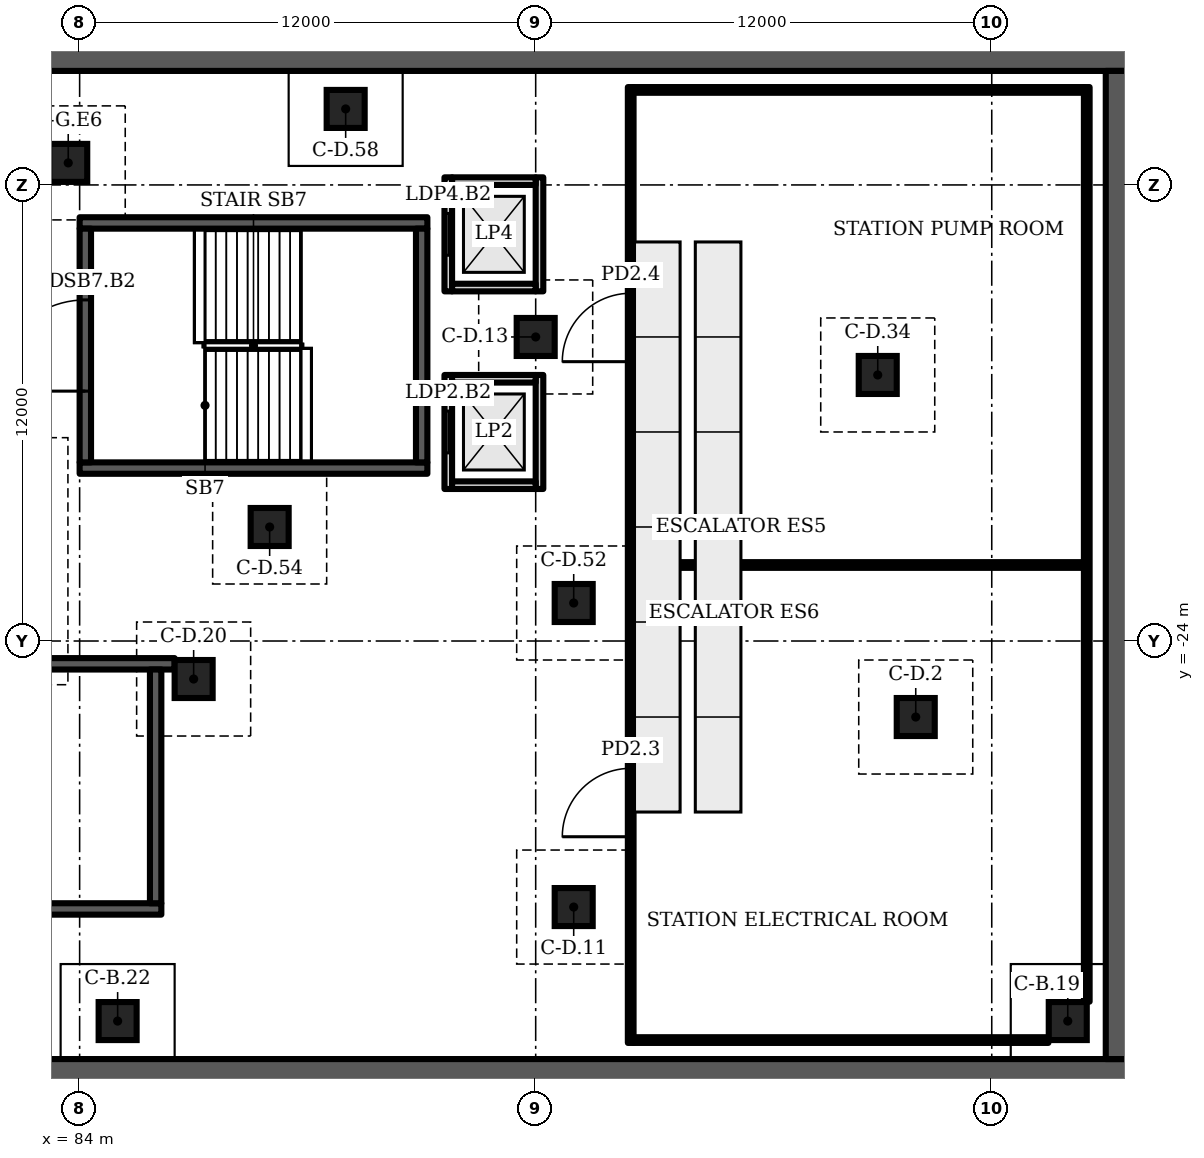
"""IFC4 building model, lengths in metres.
Left out: names, types, materials, properties, quantities, classifications, styles, units other than length and angle.
Written with IfcOpenShell. Run it as: python <this file> out.ifc"""

import sys

from ifc_helpers import new_model, si_unit, direction, frame, frame_2d, origin, origin_2d, place, context, subcontext, project, spatial, rectangle, extrude, element, fill, save


model = new_model("IFC4")
c1 = context("Model", 3, precision=1e-05, world=origin(), true_north=direction((0.0, 1.0)))
c2 = subcontext(c1, "Body", "Model", "MODEL_VIEW")
j1 = project(units=[si_unit("LENGTHUNIT", "METRE"), si_unit("PLANEANGLEUNIT", "RADIAN")], contexts=[c1])
p1 = place(None, origin())
s1 = spatial("IfcSite", under=j1, at=p1, CompositionType="ELEMENT")
p2 = place(p1, origin())
s2 = spatial("IfcBuilding", under=s1, at=p2, CompositionType="ELEMENT")
p3 = place(p2, frame((0.0, 0.0, -14.4)))
s3 = spatial("IfcBuildingStorey", under=s2, at=p3, CompositionType="ELEMENT", Elevation=-14.4)
for number, where, z_axis, x_axis in (
    (1, (-16.0, -35.5, -13.6), (0.0, 0.0, 1.0), (1.0, 0.0, 0.0)),
    (2, (-16.0, -8.5, -13.6), (0.0, 0.0, 1.0), (1.0, 0.0, 0.0)),
):
    element("IfcWall", number, at=place(p3, frame(where, z_axis=z_axis, x_axis=x_axis)), inside=s3, PredefinedType="SOLIDWALL", context=c2, shape_type="SweptSolid", body=[
        extrude(rectangle(XDim=128.0, YDim=1.0, at=frame_2d((64.0, 0.0))), origin(), (0.0, 0.0, 1.0), 20.8),
    ])
p4 = place(p3, frame((111.5, -35.0, -13.6), z_axis=(0.0, 0.0, 1.0), x_axis=(0.0, 1.0, 0.0)))
e3 = element("IfcWall", 3, at=p4, inside=s3, PredefinedType="SOLIDWALL", context=c2, shape_type="SweptSolid", body=[
    extrude(rectangle(XDim=26.0, YDim=1.0, at=frame_2d((13.0, 0.0))), origin(), (0.0, 0.0, 1.0), 20.8),
])
for number, where, z_axis, x_axis in (
    (4, (83.7, -11.42, 0.0), (0.0, 0.0, 1.0), (1.0, 0.0, 0.0)),
    (5, (106.0, -26.0, 0.0), (0.0, 0.0, 1.0), (1.0, 0.0, 0.0)),
    (6, (97.0, -31.0, 0.0), (0.0, 0.0, 1.0), (1.0, 0.0, 0.0)),
    (7, (96.0, -16.0, 0.0), (0.0, 0.0, 1.0), (1.0, 0.0, 0.0)),
    (8, (87.0, -25.0, 0.0), (0.0, 0.0, 1.0), (1.0, 0.0, 0.0)),
    (9, (105.0, -17.0, 0.0), (0.0, 0.0, 1.0), (1.0, 0.0, 0.0)),
    (10, (97.0, -23.0, 0.0), (0.0, 0.0, 1.0), (1.0, 0.0, 0.0)),
    (11, (89.0, -21.0, 0.0), (0.0, 0.0, 1.0), (1.0, 0.0, 0.0)),
    (12, (91.0, -10.0, 0.0), (0.0, 0.0, 1.0), (1.0, 0.0, 0.0)),
    (13, (110.0, -34.0, 0.0), (0.0, 0.0, 1.0), (1.0, 0.0, 0.0)),
    (14, (85.0, -34.0, 0.0), (0.0, 0.0, 1.0), (1.0, 0.0, 0.0)),
):
    element("IfcColumn", number, at=place(p3, frame(where, z_axis=z_axis, x_axis=x_axis)), inside=s3, PredefinedType="COLUMN", context=c2, shape_type="SweptSolid", body=[
        extrude(rectangle(XDim=1.0, YDim=1.0, at=origin_2d()), origin(), (0.0, 0.0, 1.0), 7.2),
    ])
p5 = place(p3, frame((98.575, -34.5, 0.0), z_axis=(0.0, 0.0, 1.0), x_axis=(1.0, 0.0, 0.0)))
e15 = element("IfcWall", 15, at=p5, inside=s3, PredefinedType="PARTITIONING", context=c2, shape_type="SweptSolid", body=[
    extrude(rectangle(XDim=10.915, YDim=0.15, at=frame_2d((5.458, 0.0))), origin(), (0.0, 0.0, 1.0), 6.9),
])
for number, where, z_axis, x_axis in (
    (16, (98.575, -22.0, 0.0), (0.0, 0.0, 1.0), (1.0, 0.0, 0.0)),
    (17, (98.575, -9.5, 0.0), (0.0, 0.0, 1.0), (1.0, 0.0, 0.0)),
):
    element("IfcWall", number, at=place(p3, frame(where, z_axis=z_axis, x_axis=x_axis)), inside=s3, PredefinedType="PARTITIONING", context=c2, shape_type="SweptSolid", body=[
        extrude(rectangle(XDim=11.85, YDim=0.15, at=frame_2d((5.925, 0.0))), origin(), (0.0, 0.0, 1.0), 6.9),
    ])
p6 = place(p3, frame((110.5, -33.49, 0.0), z_axis=(0.0, 0.0, 1.0), x_axis=(0.0, 1.0, 0.0)))
e18 = element("IfcWall", 18, at=p6, inside=s3, PredefinedType="PARTITIONING", context=c2, shape_type="SweptSolid", body=[
    extrude(rectangle(XDim=24.065, YDim=0.15, at=frame_2d((12.032, 0.0))), origin(), (0.0, 0.0, 1.0), 6.9),
])
p7 = place(p3, frame((98.5, -34.575, 0.0), z_axis=(0.0, 0.0, 1.0), x_axis=(0.0, 1.0, 0.0)))
e19 = element("IfcWall", 19, at=p7, inside=s3, PredefinedType="PARTITIONING", context=c2, shape_type="SweptSolid", body=[
    extrude(rectangle(XDim=25.15, YDim=0.15, at=frame_2d((12.575, 0.0))), origin(), (0.0, 0.0, 1.0), 6.9),
])
p8 = place(p7, frame((5.425, 0.0, 0.0)))
e20 = element("IfcOpeningElement", 20, at=p8, cuts=e19, PredefinedType="OPENING", context=c2, shape_type="SweptSolid", body=[
    extrude(rectangle(XDim=1.8, YDim=2.1, at=frame_2d((0.9, 1.05))), frame((0.0, 0.085, 0.0), z_axis=(0.0, -1.0, 0.0), x_axis=(1.0, 0.0, 0.0)), (0.0, 0.0, 1.0), 0.17),
])
p9 = place(p7, frame((17.925, 0.0, 0.0)))
e21 = element("IfcOpeningElement", 21, at=p9, cuts=e19, PredefinedType="OPENING", context=c2, shape_type="SweptSolid", body=[
    extrude(rectangle(XDim=1.8, YDim=2.1, at=frame_2d((0.9, 1.05))), frame((0.0, 0.085, 0.0), z_axis=(0.0, -1.0, 0.0), x_axis=(1.0, 0.0, 0.0)), (0.0, 0.0, 1.0), 0.17),
])
p10 = place(p3, frame((77.0, -31.05, 0.0), z_axis=(0.0, 0.0, 1.0), x_axis=(1.0, 0.0, 0.0)))
e22 = element("IfcWall", 22, at=p10, inside=s3, PredefinedType="SHEAR", context=c2, shape_type="SweptSolid", body=[
    extrude(rectangle(XDim=9.15, YDim=0.3, at=frame_2d((4.575, 0.0))), origin(), (0.0, 0.0, 1.0), 6.9),
])
p11 = place(p3, frame((77.0, -24.6, 0.0), z_axis=(0.0, 0.0, 1.0), x_axis=(1.0, 0.0, 0.0)))
e23 = element("IfcWall", 23, at=p11, inside=s3, PredefinedType="SHEAR", context=c2, shape_type="SweptSolid", body=[
    extrude(rectangle(XDim=9.5, YDim=0.3, at=frame_2d((4.75, 0.0))), origin(), (0.0, 0.0, 1.0), 6.9),
])
p12 = place(p3, frame((86.0, -30.9, 0.0), z_axis=(0.0, 0.0, 1.0), x_axis=(0.0, 1.0, 0.0)))
e24 = element("IfcWall", 24, at=p12, inside=s3, PredefinedType="SHEAR", context=c2, shape_type="SweptSolid", body=[
    extrude(rectangle(XDim=6.15, YDim=0.3, at=frame_2d((3.075, 0.0))), origin(), (0.0, 0.0, 1.0), 6.9),
])
for number, where, z_axis, x_axis in (
    (25, (84.0, -19.45, 0.0), (0.0, 0.0, 1.0), (1.0, 0.0, 0.0)),
    (26, (84.0, -13.0, 0.0), (0.0, 0.0, 1.0), (1.0, 0.0, 0.0)),
):
    element("IfcWall", number, at=place(p3, frame(where, z_axis=z_axis, x_axis=x_axis)), inside=s3, PredefinedType="SHEAR", context=c2, shape_type="SweptSolid", body=[
        extrude(rectangle(XDim=9.15, YDim=0.3, at=frame_2d((4.575, 0.0))), origin(), (0.0, 0.0, 1.0), 6.9),
    ])
p13 = place(p3, frame((84.15, -19.3, 0.0), z_axis=(0.0, 0.0, 1.0), x_axis=(0.0, 1.0, 0.0)))
e27 = element("IfcWall", 27, at=p13, inside=s3, PredefinedType="SHEAR", context=c2, shape_type="SweptSolid", body=[
    extrude(rectangle(XDim=6.15, YDim=0.3, at=frame_2d((3.075, 0.0))), origin(), (0.0, 0.0, 1.0), 6.9),
])
p14 = place(p13, frame((1.875, 0.0, 0.0)))
e28 = element("IfcOpeningElement", 28, at=p14, cuts=e27, PredefinedType="OPENING", context=c2, shape_type="SweptSolid", body=[
    extrude(rectangle(XDim=2.4, YDim=2.1, at=frame_2d((1.2, 1.05))), frame((0.0, 0.16, 0.0), z_axis=(0.0, -1.0, 0.0), x_axis=(1.0, 0.0, 0.0)), (0.0, 0.0, 1.0), 0.32),
])
p15 = place(p3, frame((93.0, -19.3, 0.0), z_axis=(0.0, 0.0, 1.0), x_axis=(0.0, 1.0, 0.0)))
e29 = element("IfcWall", 29, at=p15, inside=s3, PredefinedType="SHEAR", context=c2, shape_type="SweptSolid", body=[
    extrude(rectangle(XDim=6.15, YDim=0.3, at=frame_2d((3.075, 0.0))), origin(), (0.0, 0.0, 1.0), 6.9),
])
p16 = place(p3, frame((93.7, -20.0, 0.0), z_axis=(0.0, 0.0, 1.0), x_axis=(0.0, 1.0, 0.0)))
e30 = element("IfcWall", 30, at=p16, inside=s3, PredefinedType="PARTITIONING", context=c2, shape_type="SweptSolid", body=[
    extrude(rectangle(XDim=3.0, YDim=0.2, at=frame_2d((1.5, 0.0))), origin(), (0.0, 0.0, 1.0), 6.9),
])
p17 = place(p16, frame((0.95, 0.0, 0.0)))
e31 = element("IfcOpeningElement", 31, at=p17, cuts=e30, PredefinedType="OPENING", context=c2, shape_type="SweptSolid", body=[
    extrude(rectangle(XDim=1.1, YDim=2.1, at=frame_2d((0.55, 1.05))), frame((0.0, 0.11, 0.0), z_axis=(0.0, -1.0, 0.0), x_axis=(1.0, 0.0, 0.0)), (0.0, 0.0, 1.0), 0.22),
])
p18 = place(p3, frame((96.1, -20.0, 0.0), z_axis=(0.0, 0.0, 1.0), x_axis=(0.0, 1.0, 0.0)))
e32 = element("IfcWall", 32, at=p18, inside=s3, PredefinedType="PARTITIONING", context=c2, shape_type="SweptSolid", body=[
    extrude(rectangle(XDim=3.0, YDim=0.2, at=frame_2d((1.5, 0.0))), origin(), (0.0, 0.0, 1.0), 6.9),
])
for number, where, z_axis, x_axis in (
    (33, (93.8, -19.9, 0.0), (0.0, 0.0, 1.0), (1.0, 0.0, 0.0)),
    (34, (93.8, -17.1, 0.0), (0.0, 0.0, 1.0), (1.0, 0.0, 0.0)),
):
    element("IfcWall", number, at=place(p3, frame(where, z_axis=z_axis, x_axis=x_axis)), inside=s3, PredefinedType="PARTITIONING", context=c2, shape_type="SweptSolid", body=[
        extrude(rectangle(XDim=2.2, YDim=0.2, at=frame_2d((1.1, 0.0))), origin(), (0.0, 0.0, 1.0), 6.9),
    ])
p19 = place(p3, frame((93.7, -14.8, 0.0), z_axis=(0.0, 0.0, 1.0), x_axis=(0.0, 1.0, 0.0)))
e35 = element("IfcWall", 35, at=p19, inside=s3, PredefinedType="PARTITIONING", context=c2, shape_type="SweptSolid", body=[
    extrude(rectangle(XDim=3.0, YDim=0.2, at=frame_2d((1.5, 0.0))), origin(), (0.0, 0.0, 1.0), 6.9),
])
p20 = place(p19, frame((0.95, 0.0, 0.0)))
e36 = element("IfcOpeningElement", 36, at=p20, cuts=e35, PredefinedType="OPENING", context=c2, shape_type="SweptSolid", body=[
    extrude(rectangle(XDim=1.1, YDim=2.1, at=frame_2d((0.55, 1.05))), frame((0.0, 0.11, 0.0), z_axis=(0.0, -1.0, 0.0), x_axis=(1.0, 0.0, 0.0)), (0.0, 0.0, 1.0), 0.22),
])
p21 = place(p3, frame((96.1, -14.8, 0.0), z_axis=(0.0, 0.0, 1.0), x_axis=(0.0, 1.0, 0.0)))
e37 = element("IfcWall", 37, at=p21, inside=s3, PredefinedType="PARTITIONING", context=c2, shape_type="SweptSolid", body=[
    extrude(rectangle(XDim=3.0, YDim=0.2, at=frame_2d((1.5, 0.0))), origin(), (0.0, 0.0, 1.0), 6.9),
])
for number, where, z_axis, x_axis in (
    (38, (93.8, -14.7, 0.0), (0.0, 0.0, 1.0), (1.0, 0.0, 0.0)),
    (39, (93.8, -11.9, 0.0), (0.0, 0.0, 1.0), (1.0, 0.0, 0.0)),
):
    element("IfcWall", number, at=place(p3, frame(where, z_axis=z_axis, x_axis=x_axis)), inside=s3, PredefinedType="PARTITIONING", context=c2, shape_type="SweptSolid", body=[
        extrude(rectangle(XDim=2.2, YDim=0.2, at=frame_2d((1.1, 0.0))), origin(), (0.0, 0.0, 1.0), 6.9),
    ])
p22 = place(p8, origin())
e40 = element("IfcDoor", 40, at=p22, inside=s3, OperationType="DOUBLE_DOOR_SINGLE_SWING", PredefinedType="DOOR", context=c2, shape_type="SweptSolid", body=[
    extrude(rectangle(XDim=1.8, YDim=2.1, at=frame_2d((0.9, 1.05))), frame((0.0, 0.025, 0.0), z_axis=(0.0, -1.0, 0.0), x_axis=(1.0, 0.0, 0.0)), (0.0, 0.0, 1.0), 0.05),
])
fill(e20, e40)
p23 = place(p9, origin())
e41 = element("IfcDoor", 41, at=p23, inside=s3, OperationType="DOUBLE_DOOR_SINGLE_SWING", PredefinedType="DOOR", context=c2, shape_type="SweptSolid", body=[
    extrude(rectangle(XDim=1.8, YDim=2.1, at=frame_2d((0.9, 1.05))), frame((0.0, 0.025, 0.0), z_axis=(0.0, -1.0, 0.0), x_axis=(1.0, 0.0, 0.0)), (0.0, 0.0, 1.0), 0.05),
])
fill(e21, e41)
p24 = place(p14, origin())
e42 = element("IfcDoor", 42, at=p24, inside=s3, OperationType="DOUBLE_DOOR_SINGLE_SWING", PredefinedType="DOOR", context=c2, shape_type="SweptSolid", body=[
    extrude(rectangle(XDim=2.4, YDim=2.1, at=frame_2d((1.2, 1.05))), frame((0.0, 0.025, 0.0), z_axis=(0.0, -1.0, 0.0), x_axis=(1.0, 0.0, 0.0)), (0.0, 0.0, 1.0), 0.05),
])
fill(e28, e42)
p25 = place(p17, origin())
e43 = element("IfcDoor", 43, at=p25, inside=s3, OperationType="DOUBLE_DOOR_SLIDING", PredefinedType="DOOR", context=c2, shape_type="SweptSolid", body=[
    extrude(rectangle(XDim=1.1, YDim=2.1, at=frame_2d((0.55, 1.05))), frame((0.0, 0.025, 0.0), z_axis=(0.0, -1.0, 0.0), x_axis=(1.0, 0.0, 0.0)), (0.0, 0.0, 1.0), 0.05),
])
fill(e31, e43)
p26 = place(p20, origin())
e44 = element("IfcDoor", 44, at=p26, inside=s3, OperationType="DOUBLE_DOOR_SLIDING", PredefinedType="DOOR", context=c2, shape_type="SweptSolid", body=[
    extrude(rectangle(XDim=1.1, YDim=2.1, at=frame_2d((0.55, 1.05))), frame((0.0, 0.025, 0.0), z_axis=(0.0, -1.0, 0.0), x_axis=(1.0, 0.0, 0.0)), (0.0, 0.0, 1.0), 0.05),
])
fill(e36, e44)
save(model, sys.argv[1])
